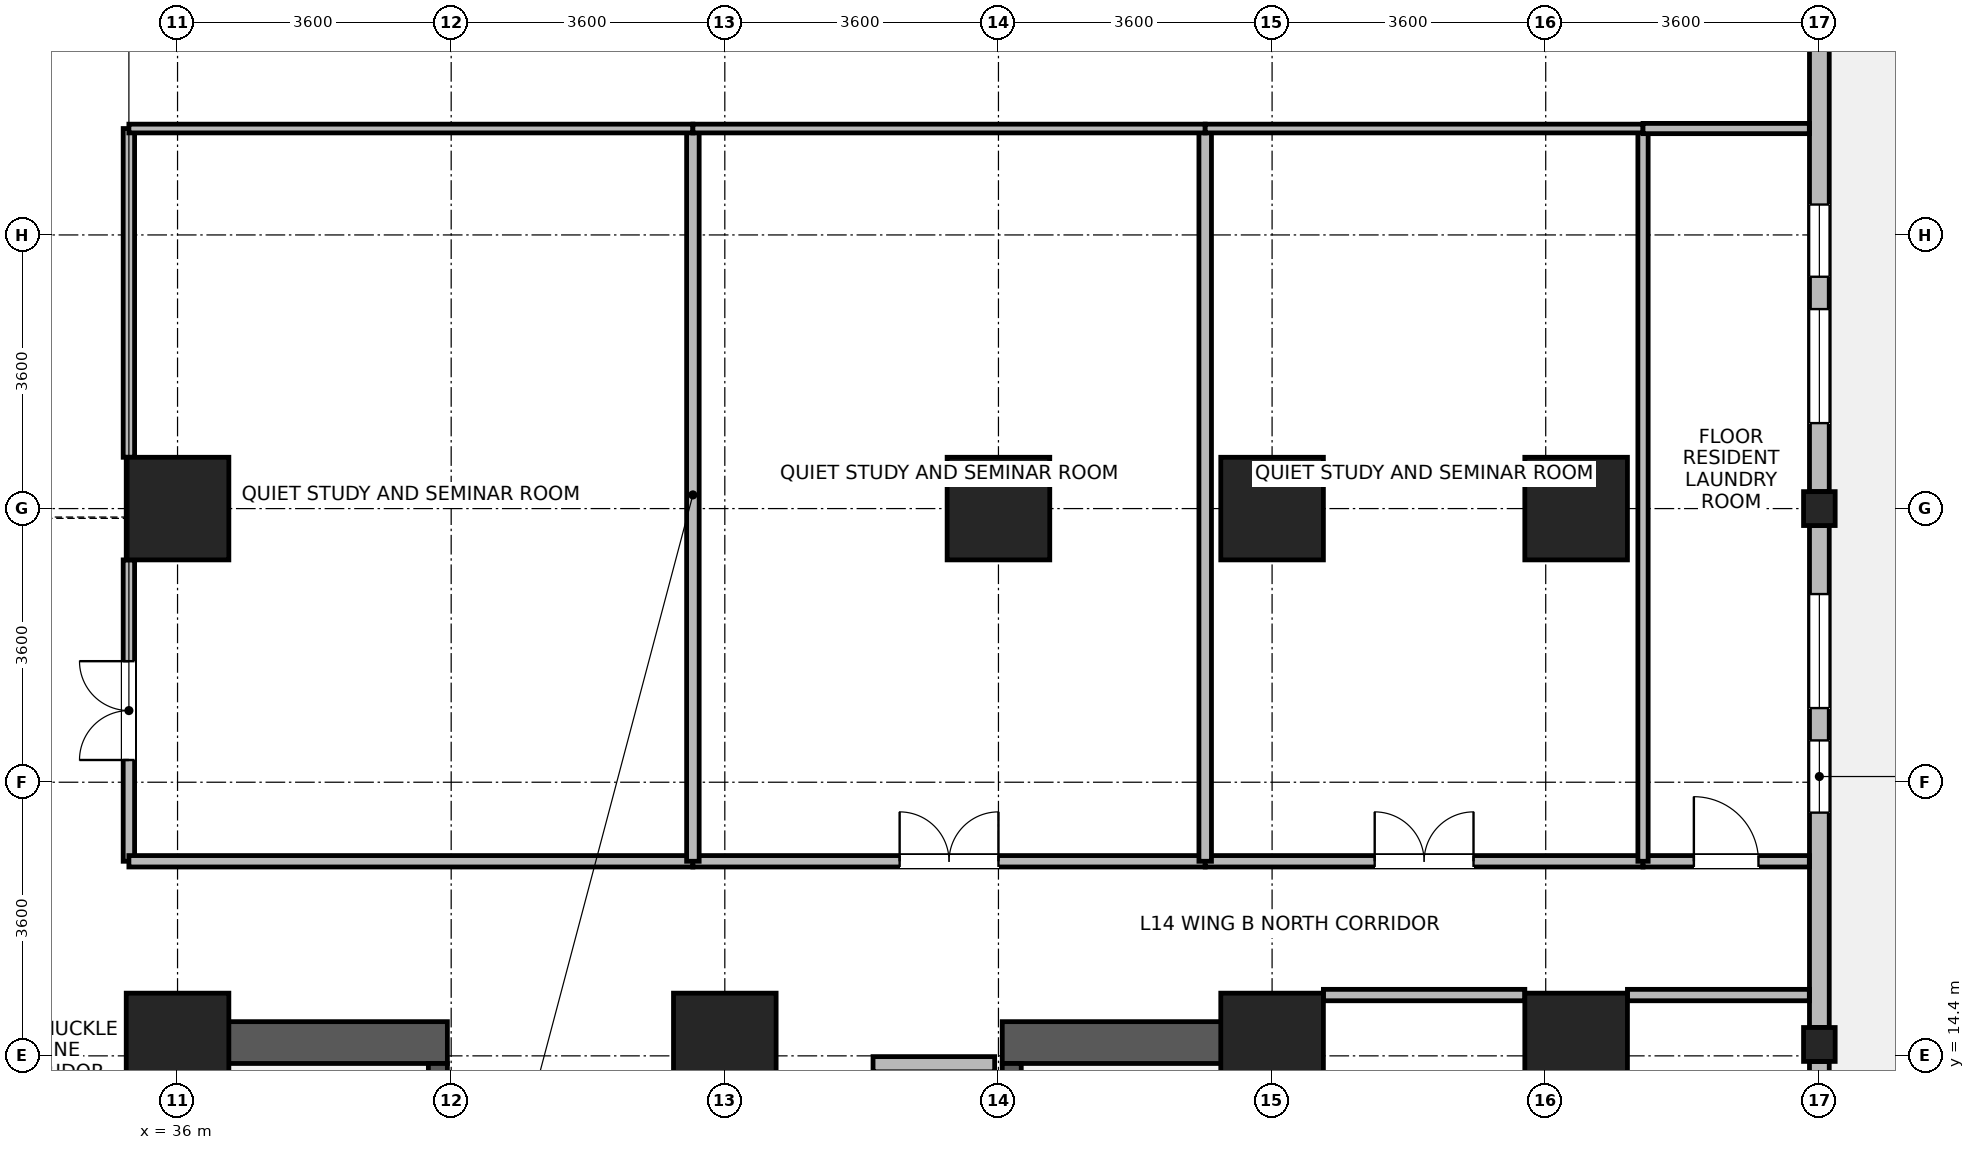
"""IFC4 building model, lengths in metres.
Left out: names, types, materials, properties, quantities, classifications, styles, units other than length and angle.
Written with IfcOpenShell. Run it as: python <this file> out.ifc"""

import sys

from ifc_helpers import new_model, si_unit, direction, frame, frame_2d, origin, origin_2d, place, context, subcontext, project, spatial, rectangle, i_section, extrude, source, transform, mapped, element, fill, save


model = new_model("IFC4")
c1 = context("Model", 3, precision=1e-05, world=origin(), true_north=direction((0.0, 1.0)))
c2 = subcontext(c1, "Body", "Model", "MODEL_VIEW")
j1 = project(units=[si_unit("LENGTHUNIT", "METRE"), si_unit("PLANEANGLEUNIT", "RADIAN")], contexts=[c1])
p1 = place(None, origin())
s1 = spatial("IfcSite", under=j1, at=p1, CompositionType="ELEMENT")
p2 = place(p1, origin())
s2 = spatial("IfcBuilding", under=s1, at=p2, CompositionType="ELEMENT")
p3 = place(p2, frame((0.0, 0.0, 58.6)))
s3 = spatial("IfcBuildingStorey", under=s2, at=p3, CompositionType="ELEMENT", Elevation=58.6)
for number, where, z_axis, x_axis in (
    (1, (36.075, 6.75, 0.0), (0.0, 0.0, 1.0), (0.0, 1.0, 0.0)),
    (2, (50.325, 6.75, 0.0), (0.0, 0.0, 1.0), (0.0, 1.0, 0.0)),
):
    element("IfcWall", number, at=place(p3, frame(where, z_axis=z_axis, x_axis=x_axis)), inside=s3, PredefinedType="SHEAR", context=c2, shape_type="SweptSolid", body=[
        extrude(rectangle(XDim=8.1, YDim=0.55, at=frame_2d((4.05, 0.0))), origin(), (0.0, 0.0, 1.0), 3.45),
    ])
for number, where, z_axis, x_axis in (
    (3, (36.35, 14.575, 0.0), (0.0, 0.0, 1.0), (1.0, 0.0, 0.0)),
    (4, (46.85, 14.575, 0.0), (0.0, 0.0, 1.0), (1.0, 0.0, 0.0)),
):
    element("IfcWall", number, at=place(p3, frame(where, z_axis=z_axis, x_axis=x_axis)), inside=s3, PredefinedType="SHEAR", context=c2, shape_type="SweptSolid", body=[
        extrude(rectangle(XDim=3.2, YDim=0.55, at=frame_2d((1.6, 0.0))), origin(), (0.0, 0.0, 1.0), 3.45),
    ])
p4 = place(p3, frame((39.425, 7.3, 0.0), z_axis=(0.0, 0.0, 1.0), x_axis=(0.0, 1.0, 0.0)))
e5 = element("IfcWall", 5, at=p4, inside=s3, PredefinedType="SHEAR", context=c2, shape_type="SweptSolid", body=[
    extrude(rectangle(XDim=7.0, YDim=0.25, at=frame_2d((3.5, 0.0))), origin(), (0.0, 0.0, 1.0), 3.45),
])
p5 = place(p4, frame((0.15, 0.0, 0.0)))
e6 = element("IfcOpeningElement", 6, at=p5, cuts=e5, PredefinedType="OPENING", context=c2, shape_type="SweptSolid", body=[
    extrude(rectangle(XDim=1.1, YDim=2.08, at=frame_2d((0.55, 1.04))), frame((0.0, 0.135, 0.0), z_axis=(0.0, -1.0, 0.0), x_axis=(1.0, 0.0, 0.0)), (0.0, 0.0, 1.0), 0.27),
])
p6 = place(p3, frame((46.975, 7.3, 0.0), z_axis=(0.0, 0.0, 1.0), x_axis=(0.0, 1.0, 0.0)))
e7 = element("IfcWall", 7, at=p6, inside=s3, PredefinedType="SHEAR", context=c2, shape_type="SweptSolid", body=[
    extrude(rectangle(XDim=7.0, YDim=0.25, at=frame_2d((3.5, 0.0))), origin(), (0.0, 0.0, 1.0), 3.45),
])
p7 = place(p6, frame((0.15, 0.0, 0.0)))
e8 = element("IfcOpeningElement", 8, at=p7, cuts=e7, PredefinedType="OPENING", context=c2, shape_type="SweptSolid", body=[
    extrude(rectangle(XDim=1.1, YDim=2.08, at=frame_2d((0.55, 1.04))), frame((0.0, 0.135, 0.0), z_axis=(0.0, -1.0, 0.0), x_axis=(1.0, 0.0, 0.0)), (0.0, 0.0, 1.0), 0.27),
])
m1 = source(origin(), c2, "Body", "SweptSolid", [
    extrude(rectangle(XDim=1.35, YDim=1.35, at=origin_2d()), origin(), (0.0, 0.0, 1.0), 3.7),
])
for number, where, z_axis, x_axis in (
    (9, (36.0, 21.6, 0.0), (0.0, 0.0, 1.0), (1.0, 0.0, 0.0)),
    (10, (46.8, 21.6, 0.0), (0.0, 0.0, 1.0), (1.0, 0.0, 0.0)),
    (11, (36.0, 14.55, 0.0), (0.0, 0.0, 1.0), (1.0, 0.0, 0.0)),
    (12, (43.2, 14.55, 0.0), (0.0, 0.0, 1.0), (1.0, 0.0, 0.0)),
    (13, (50.4, 14.55, 0.0), (0.0, 0.0, 1.0), (1.0, 0.0, 0.0)),
    (14, (50.4, 21.6, 0.0), (0.0, 0.0, 1.0), (1.0, 0.0, 0.0)),
    (15, (54.4, 14.55, 0.0), (0.0, 0.0, 1.0), (1.0, 0.0, 0.0)),
    (16, (54.4, 21.6, 0.0), (0.0, 0.0, 1.0), (1.0, 0.0, 0.0)),
):
    element("IfcColumn", number, at=place(p3, frame(where, z_axis=z_axis, x_axis=x_axis)), inside=s3, PredefinedType="COLUMN", context=c2, shape_type="MappedRepresentation", body=[
        mapped(m1, transform((0.0, 0.0, 0.0), x_axis=(1.0, 0.0, 0.0), y_axis=(0.0, 1.0, 0.0), z_axis=(0.0, 0.0, 1.0), scale=1.0)),
    ])
m2 = source(origin(), c2, "Body", "SweptSolid", [
    extrude(i_section(OverallWidth=0.416, OverallDepth=0.446, WebThickness=0.029, FlangeThickness=0.04, FilletRadius=0.015, at=origin_2d()), origin(), (0.0, 0.0, 1.0), 3.7),
])
for number, where, z_axis, x_axis in (
    (17, (57.6, 14.55, 0.0), (0.0, 0.0, 1.0), (1.0, 0.0, 0.0)),
    (18, (57.6, 21.6, 0.0), (0.0, 0.0, 1.0), (1.0, 0.0, 0.0)),
):
    element("IfcColumn", number, at=place(p3, frame(where, z_axis=z_axis, x_axis=x_axis)), inside=s3, PredefinedType="COLUMN", context=c2, shape_type="MappedRepresentation", body=[
        mapped(m2, transform((0.0, 0.0, 0.0), x_axis=(1.0, 0.0, 0.0), y_axis=(0.0, 1.0, 0.0), z_axis=(0.0, 0.0, 1.0), scale=1.0)),
    ])
p8 = place(p3, frame((57.6, 14.326, 0.0), z_axis=(0.0, 0.0, 1.0), x_axis=(0.0, -1.0, 0.0)))
e19 = element("IfcWall", 19, at=p8, inside=s3, PredefinedType="STANDARD", context=c2, shape_type="SweptSolid", body=[
    extrude(rectangle(XDim=7.052, YDim=0.26, at=frame_2d((3.526, 0.0))), origin(), (0.0, 0.0, 1.0), 2.93),
])
p9 = place(p8, frame((2.776, 0.0, 0.0)))
e20 = element("IfcOpeningElement", 20, at=p9, cuts=e19, PredefinedType="OPENING", context=c2, shape_type="SweptSolid", body=[
    extrude(rectangle(XDim=1.5, YDim=2.15, at=frame_2d((0.75, 1.075))), frame((0.0, 0.14, 0.0), z_axis=(0.0, -1.0, 0.0), x_axis=(1.0, 0.0, 0.0)), (0.0, 0.0, 1.0), 0.28),
])
p10 = place(p8, frame((1.013, 0.0, 0.85)))
e21 = element("IfcOpeningElement", 21, at=p10, cuts=e19, PredefinedType="OPENING", context=c2, shape_type="SweptSolid", body=[
    extrude(rectangle(XDim=1.5, YDim=1.85, at=frame_2d((0.75, 0.925))), frame((0.0, 0.14, 0.0), z_axis=(0.0, -1.0, 0.0), x_axis=(1.0, 0.0, 0.0)), (0.0, 0.0, 1.0), 0.28),
])
p11 = place(p8, frame((4.539, 0.0, 0.85)))
e22 = element("IfcOpeningElement", 22, at=p11, cuts=e19, PredefinedType="OPENING", context=c2, shape_type="SweptSolid", body=[
    extrude(rectangle(XDim=1.5, YDim=1.85, at=frame_2d((0.75, 0.925))), frame((0.0, 0.14, 0.0), z_axis=(0.0, -1.0, 0.0), x_axis=(1.0, 0.0, 0.0)), (0.0, 0.0, 1.0), 0.28),
])
p12 = place(p3, frame((57.6, 21.376, 0.0), z_axis=(0.0, 0.0, 1.0), x_axis=(0.0, -1.0, 0.0)))
e23 = element("IfcWall", 23, at=p12, inside=s3, PredefinedType="STANDARD", context=c2, shape_type="SweptSolid", body=[
    extrude(rectangle(XDim=6.602, YDim=0.26, at=frame_2d((3.301, 0.0))), origin(), (0.0, 0.0, 1.0), 2.93),
])
p13 = place(p12, frame((0.9, 0.0, 0.85)))
e24 = element("IfcOpeningElement", 24, at=p13, cuts=e23, PredefinedType="OPENING", context=c2, shape_type="SweptSolid", body=[
    extrude(rectangle(XDim=1.5, YDim=1.85, at=frame_2d((0.75, 0.925))), frame((0.0, 0.14, 0.0), z_axis=(0.0, -1.0, 0.0), x_axis=(1.0, 0.0, 0.0)), (0.0, 0.0, 1.0), 0.28),
])
p14 = place(p12, frame((2.826, 0.0, 0.85)))
e25 = element("IfcOpeningElement", 25, at=p14, cuts=e23, PredefinedType="OPENING", context=c2, shape_type="SweptSolid", body=[
    extrude(rectangle(XDim=0.95, YDim=1.75, at=frame_2d((0.475, 0.875))), frame((0.0, 0.14, 0.0), z_axis=(0.0, -1.0, 0.0), x_axis=(1.0, 0.0, 0.0)), (0.0, 0.0, 1.0), 0.28),
])
p15 = place(p3, frame((57.6, 28.426, 0.0), z_axis=(0.0, 0.0, 1.0), x_axis=(0.0, -1.0, 0.0)))
e26 = element("IfcWall", 26, at=p15, inside=s3, PredefinedType="STANDARD", context=c2, shape_type="SweptSolid", body=[
    extrude(rectangle(XDim=6.602, YDim=0.26, at=frame_2d((3.301, 0.0))), origin(), (0.0, 0.0, 1.0), 2.93),
])
p16 = place(p15, frame((4.201, 0.0, 0.85)))
e27 = element("IfcOpeningElement", 27, at=p16, cuts=e26, PredefinedType="OPENING", context=c2, shape_type="SweptSolid", body=[
    extrude(rectangle(XDim=1.5, YDim=1.85, at=frame_2d((0.75, 0.925))), frame((0.0, 0.14, 0.0), z_axis=(0.0, -1.0, 0.0), x_axis=(1.0, 0.0, 0.0)), (0.0, 0.0, 1.0), 0.28),
])
p17 = place(p15, frame((2.826, 0.0, 0.85)))
e28 = element("IfcOpeningElement", 28, at=p17, cuts=e26, PredefinedType="OPENING", context=c2, shape_type="SweptSolid", body=[
    extrude(rectangle(XDim=0.95, YDim=1.75, at=frame_2d((0.475, 0.875))), frame((0.0, 0.14, 0.0), z_axis=(0.0, -1.0, 0.0), x_axis=(1.0, 0.0, 0.0)), (0.0, 0.0, 1.0), 0.28),
])
p18 = place(p3, frame((45.15, 14.29, 0.0), z_axis=(0.0, 0.0, 1.0), x_axis=(1.0, 0.0, 0.0)))
e29 = element("IfcWall", 29, at=p18, inside=s3, PredefinedType="PARTITIONING", context=c2, shape_type="SweptSolid", body=[
    extrude(rectangle(XDim=1.6, YDim=0.2, at=frame_2d((0.8, 0.0))), origin(), (0.0, 0.0, 1.0), 2.23),
])
p19 = place(p3, frame((35.36, 16.96, 0.0), z_axis=(0.0, 0.0, 1.0), x_axis=(0.0, 1.0, 0.0)))
e30 = element("IfcWall", 30, at=p19, inside=s3, PredefinedType="PARTITIONING", context=c2, shape_type="SweptSolid", body=[
    extrude(rectangle(XDim=3.965, YDim=0.15, at=frame_2d((1.982, 0.0))), origin(), (0.0, 0.0, 1.0), 3.43),
])
p20 = place(p19, frame((1.333, 0.0, 0.0)))
e31 = element("IfcOpeningElement", 31, at=p20, cuts=e30, PredefinedType="OPENING", context=c2, shape_type="SweptSolid", body=[
    extrude(rectangle(XDim=1.3, YDim=2.12, at=frame_2d((0.65, 1.06))), frame((0.0, 0.085, 0.0), z_axis=(0.0, -1.0, 0.0), x_axis=(1.0, 0.0, 0.0)), (0.0, 0.0, 1.0), 0.17),
])
p21 = place(p3, frame((35.36, 22.275, 0.0), z_axis=(0.0, 0.0, 1.0), x_axis=(0.0, 1.0, 0.0)))
e32 = element("IfcWall", 32, at=p21, inside=s3, PredefinedType="PARTITIONING", context=c2, shape_type="SweptSolid", body=[
    extrude(rectangle(XDim=4.325, YDim=0.15, at=frame_2d((2.163, 0.0))), origin(), (0.0, 0.0, 1.0), 3.43),
])
p22 = place(p3, frame((35.36, 16.96, 0.0), z_axis=(0.0, 0.0, 1.0), x_axis=(1.0, 0.0, 0.0)))
e33 = element("IfcWall", 33, at=p22, inside=s3, PredefinedType="PARTITIONING", context=c2, shape_type="SweptSolid", body=[
    extrude(rectangle(XDim=7.42, YDim=0.15, at=frame_2d((3.71, 0.0))), origin(), (0.0, 0.0, 1.0), 3.43),
])
p23 = place(p3, frame((51.075, 15.2, 0.0), z_axis=(0.0, 0.0, 1.0), x_axis=(1.0, 0.0, 0.0)))
e34 = element("IfcWall", 34, at=p23, inside=s3, PredefinedType="PARTITIONING", context=c2, shape_type="SweptSolid", body=[
    extrude(rectangle(XDim=2.65, YDim=0.15, at=frame_2d((1.325, 0.0))), origin(), (0.0, 0.0, 1.0), 3.43),
])
p24 = place(p3, frame((55.075, 15.2, 0.0), z_axis=(0.0, 0.0, 1.0), x_axis=(1.0, 0.0, 0.0)))
e35 = element("IfcWall", 35, at=p24, inside=s3, PredefinedType="PARTITIONING", context=c2, shape_type="SweptSolid", body=[
    extrude(rectangle(XDim=2.393, YDim=0.15, at=frame_2d((1.197, 0.0))), origin(), (0.0, 0.0, 1.0), 3.43),
])
p25 = place(p3, frame((42.78, 16.96, 0.0), z_axis=(0.0, 0.0, 1.0), x_axis=(1.0, 0.0, 0.0)))
e36 = element("IfcWall", 36, at=p25, inside=s3, PredefinedType="PARTITIONING", context=c2, shape_type="SweptSolid", body=[
    extrude(rectangle(XDim=6.74, YDim=0.15, at=frame_2d((3.37, 0.0))), origin(), (0.0, 0.0, 1.0), 3.43),
])
p26 = place(p25, frame((2.72, 0.0, 0.0)))
e37 = element("IfcOpeningElement", 37, at=p26, cuts=e36, PredefinedType="OPENING", context=c2, shape_type="SweptSolid", body=[
    extrude(rectangle(XDim=1.3, YDim=2.12, at=frame_2d((0.65, 1.06))), frame((0.0, 0.085, 0.0), z_axis=(0.0, -1.0, 0.0), x_axis=(1.0, 0.0, 0.0)), (0.0, 0.0, 1.0), 0.17),
])
p27 = place(p3, frame((49.52, 16.96, 0.0), z_axis=(0.0, 0.0, 1.0), x_axis=(1.0, 0.0, 0.0)))
e38 = element("IfcWall", 38, at=p27, inside=s3, PredefinedType="PARTITIONING", context=c2, shape_type="SweptSolid", body=[
    extrude(rectangle(XDim=5.76, YDim=0.15, at=frame_2d((2.88, 0.0))), origin(), (0.0, 0.0, 1.0), 3.43),
])
p28 = place(p27, frame((2.23, 0.0, 0.0)))
e39 = element("IfcOpeningElement", 39, at=p28, cuts=e38, PredefinedType="OPENING", context=c2, shape_type="SweptSolid", body=[
    extrude(rectangle(XDim=1.3, YDim=2.12, at=frame_2d((0.65, 1.06))), frame((0.0, 0.085, 0.0), z_axis=(0.0, -1.0, 0.0), x_axis=(1.0, 0.0, 0.0)), (0.0, 0.0, 1.0), 0.17),
])
p29 = place(p3, frame((55.28, 16.96, 0.0), z_axis=(0.0, 0.0, 1.0), x_axis=(1.0, 0.0, 0.0)))
e40 = element("IfcWall", 40, at=p29, inside=s3, PredefinedType="PARTITIONING", context=c2, shape_type="SweptSolid", body=[
    extrude(rectangle(XDim=2.188, YDim=0.15, at=frame_2d((1.094, 0.0))), origin(), (0.0, 0.0, 1.0), 3.43),
])
p30 = place(p29, frame((0.669, 0.0, 0.0)))
e41 = element("IfcOpeningElement", 41, at=p30, cuts=e40, PredefinedType="OPENING", context=c2, shape_type="SweptSolid", body=[
    extrude(rectangle(XDim=0.85, YDim=2.04, at=frame_2d((0.425, 1.02))), frame((0.0, 0.085, 0.0), z_axis=(0.0, -1.0, 0.0), x_axis=(1.0, 0.0, 0.0)), (0.0, 0.0, 1.0), 0.17),
])
for number, where, z_axis, x_axis in (
    (42, (42.78, 16.96, 0.0), (0.0, 0.0, 1.0), (0.0, 1.0, 0.0)),
    (43, (49.52, 16.96, 0.0), (0.0, 0.0, 1.0), (0.0, 1.0, 0.0)),
):
    element("IfcWall", number, at=place(p3, frame(where, z_axis=z_axis, x_axis=x_axis)), inside=s3, PredefinedType="PARTITIONING", context=c2, shape_type="SweptSolid", body=[
        extrude(rectangle(XDim=9.64, YDim=0.165, at=frame_2d((4.82, 0.0))), origin(), (0.0, 0.0, 1.0), 3.43),
    ])
p31 = place(p3, frame((55.28, 16.96, 0.0), z_axis=(0.0, 0.0, 1.0), x_axis=(0.0, 1.0, 0.0)))
e44 = element("IfcWall", 44, at=p31, inside=s3, PredefinedType="PARTITIONING", context=c2, shape_type="SweptSolid", body=[
    extrude(rectangle(XDim=9.64, YDim=0.135, at=frame_2d((4.82, 0.0))), origin(), (0.0, 0.0, 1.0), 3.43),
])
p32 = place(p3, frame((35.36, 26.6, 0.0), z_axis=(0.0, 0.0, 1.0), x_axis=(1.0, 0.0, 0.0)))
e45 = element("IfcWall", 45, at=p32, inside=s3, PredefinedType="PARTITIONING", context=c2, shape_type="SweptSolid", body=[
    extrude(rectangle(XDim=7.42, YDim=0.115, at=frame_2d((3.71, 0.0))), origin(), (0.0, 0.0, 1.0), 3.43),
])
p33 = place(p3, frame((42.78, 26.6, 0.0), z_axis=(0.0, 0.0, 1.0), x_axis=(1.0, 0.0, 0.0)))
e46 = element("IfcWall", 46, at=p33, inside=s3, PredefinedType="PARTITIONING", context=c2, shape_type="SweptSolid", body=[
    extrude(rectangle(XDim=6.74, YDim=0.115, at=frame_2d((3.37, 0.0))), origin(), (0.0, 0.0, 1.0), 3.43),
])
p34 = place(p3, frame((49.52, 26.6, 0.0), z_axis=(0.0, 0.0, 1.0), x_axis=(1.0, 0.0, 0.0)))
e47 = element("IfcWall", 47, at=p34, inside=s3, PredefinedType="PARTITIONING", context=c2, shape_type="SweptSolid", body=[
    extrude(rectangle(XDim=5.76, YDim=0.115, at=frame_2d((2.88, 0.0))), origin(), (0.0, 0.0, 1.0), 3.43),
])
p35 = place(p3, frame((55.28, 26.6, 0.0), z_axis=(0.0, 0.0, 1.0), x_axis=(1.0, 0.0, 0.0)))
e48 = element("IfcWall", 48, at=p35, inside=s3, PredefinedType="PARTITIONING", context=c2, shape_type="SweptSolid", body=[
    extrude(rectangle(XDim=2.188, YDim=0.135, at=frame_2d((1.094, 0.0))), origin(), (0.0, 0.0, 1.0), 3.43),
])
p36 = place(p13, origin())
e49 = element("IfcWindow", 49, at=p36, inside=s3, PartitioningType="SINGLE_PANEL", PredefinedType="WINDOW", context=c2, shape_type="SweptSolid", body=[
    extrude(rectangle(XDim=1.5, YDim=1.85, at=frame_2d((0.75, 0.925))), frame((0.0, 0.03, 0.0), z_axis=(0.0, -1.0, 0.0), x_axis=(1.0, 0.0, 0.0)), (0.0, 0.0, 1.0), 0.06),
])
fill(e24, e49)
p37 = place(p14, origin())
e50 = element("IfcWindow", 50, at=p37, inside=s3, PartitioningType="SINGLE_PANEL", PredefinedType="WINDOW", context=c2, shape_type="SweptSolid", body=[
    extrude(rectangle(XDim=0.95, YDim=1.75, at=frame_2d((0.475, 0.875))), frame((0.0, 0.03, 0.0), z_axis=(0.0, -1.0, 0.0), x_axis=(1.0, 0.0, 0.0)), (0.0, 0.0, 1.0), 0.06),
])
fill(e25, e50)
p38 = place(p16, origin())
e51 = element("IfcWindow", 51, at=p38, inside=s3, PartitioningType="SINGLE_PANEL", PredefinedType="WINDOW", context=c2, shape_type="SweptSolid", body=[
    extrude(rectangle(XDim=1.5, YDim=1.85, at=frame_2d((0.75, 0.925))), frame((0.0, 0.03, 0.0), z_axis=(0.0, -1.0, 0.0), x_axis=(1.0, 0.0, 0.0)), (0.0, 0.0, 1.0), 0.06),
])
fill(e27, e51)
p39 = place(p17, origin())
e52 = element("IfcWindow", 52, at=p39, inside=s3, PartitioningType="SINGLE_PANEL", PredefinedType="WINDOW", context=c2, shape_type="SweptSolid", body=[
    extrude(rectangle(XDim=0.95, YDim=1.75, at=frame_2d((0.475, 0.875))), frame((0.0, 0.03, 0.0), z_axis=(0.0, -1.0, 0.0), x_axis=(1.0, 0.0, 0.0)), (0.0, 0.0, 1.0), 0.06),
])
fill(e28, e52)
p40 = place(p20, origin())
e53 = element("IfcDoor", 53, at=p40, inside=s3, OperationType="DOUBLE_DOOR_SINGLE_SWING", PredefinedType="DOOR", context=c2, shape_type="SweptSolid", body=[
    extrude(rectangle(XDim=1.3, YDim=2.12, at=frame_2d((0.65, 1.06))), frame((0.0, 0.025, 0.0), z_axis=(0.0, -1.0, 0.0), x_axis=(1.0, 0.0, 0.0)), (0.0, 0.0, 1.0), 0.05),
])
fill(e31, e53)
p41 = place(p26, origin())
e54 = element("IfcDoor", 54, at=p41, inside=s3, OperationType="DOUBLE_DOOR_SINGLE_SWING", PredefinedType="DOOR", context=c2, shape_type="SweptSolid", body=[
    extrude(rectangle(XDim=1.3, YDim=2.12, at=frame_2d((0.65, 1.06))), frame((0.0, 0.025, 0.0), z_axis=(0.0, -1.0, 0.0), x_axis=(1.0, 0.0, 0.0)), (0.0, 0.0, 1.0), 0.05),
])
fill(e37, e54)
p42 = place(p28, origin())
e55 = element("IfcDoor", 55, at=p42, inside=s3, OperationType="DOUBLE_DOOR_SINGLE_SWING", PredefinedType="DOOR", context=c2, shape_type="SweptSolid", body=[
    extrude(rectangle(XDim=1.3, YDim=2.12, at=frame_2d((0.65, 1.06))), frame((0.0, 0.025, 0.0), z_axis=(0.0, -1.0, 0.0), x_axis=(1.0, 0.0, 0.0)), (0.0, 0.0, 1.0), 0.05),
])
fill(e39, e55)
p43 = place(p30, origin())
e56 = element("IfcDoor", 56, at=p43, inside=s3, OperationType="SINGLE_SWING_LEFT", PredefinedType="DOOR", context=c2, shape_type="SweptSolid", body=[
    extrude(rectangle(XDim=0.85, YDim=2.04, at=frame_2d((0.425, 1.02))), frame((0.0, 0.025, 0.0), z_axis=(0.0, -1.0, 0.0), x_axis=(1.0, 0.0, 0.0)), (0.0, 0.0, 1.0), 0.05),
])
fill(e41, e56)
save(model, sys.argv[1])
